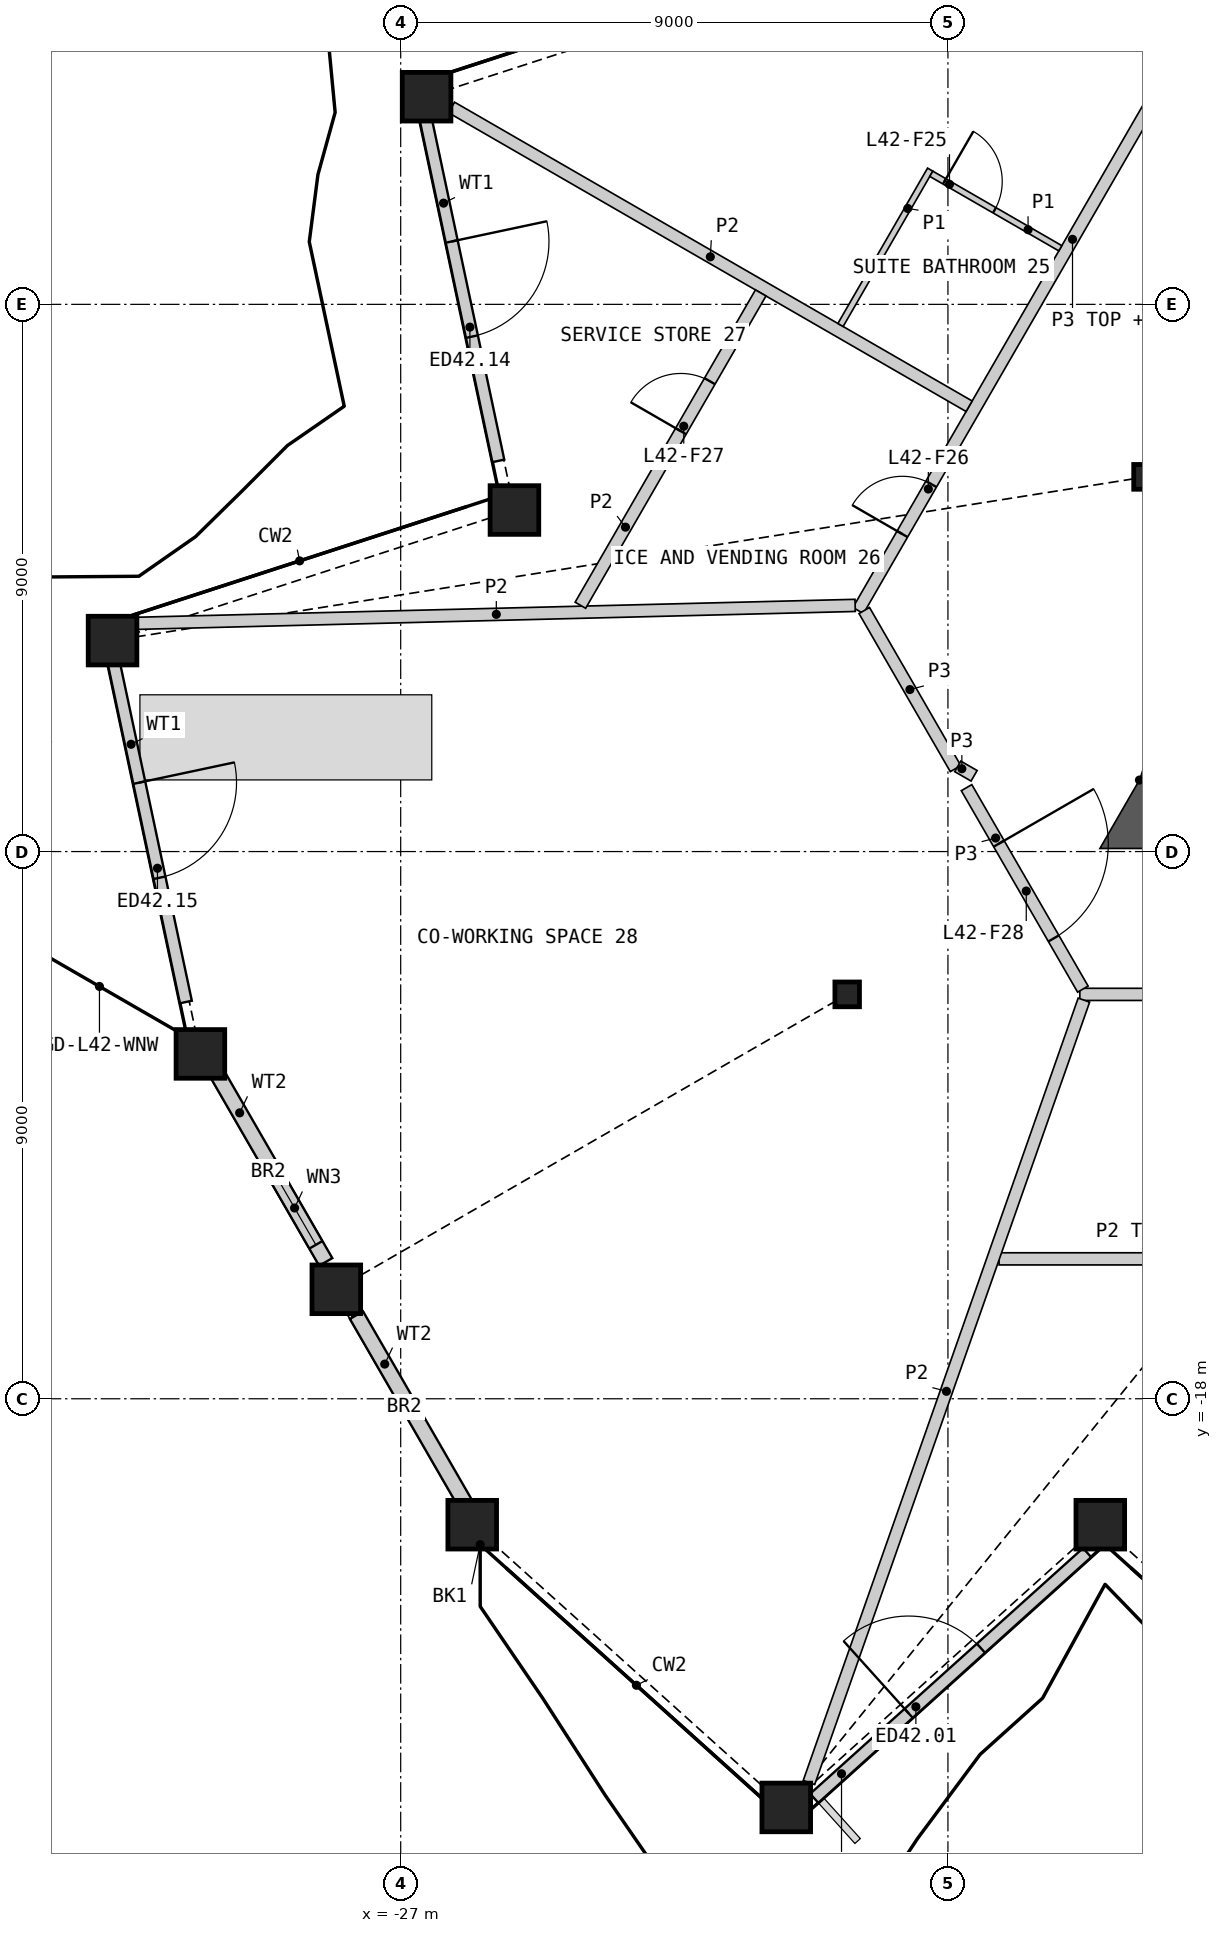
"""IFC4 building model, lengths in metres.
Left out: names, types, materials, properties, quantities, classifications, styles, units other than length and angle.
Written with IfcOpenShell. Run it as: python <this file> out.ifc"""

import sys

from ifc_helpers import new_model, si_unit, direction, frame, frame_2d, origin, origin_2d, place, context, subcontext, project, spatial, polyline, rectangle, hollow_rectangle, i_section, outline, extrude, element, fill, save


model = new_model("IFC4")
c1 = context("Model", 3, precision=1e-05, world=origin(), true_north=direction((0.0, 1.0)))
c2 = subcontext(c1, "Body", "Model", "MODEL_VIEW")
j1 = project(units=[si_unit("LENGTHUNIT", "METRE"), si_unit("PLANEANGLEUNIT", "RADIAN")], contexts=[c1])
p1 = place(None, origin())
s1 = spatial("IfcSite", under=j1, at=p1, CompositionType="ELEMENT")
p2 = place(p1, origin())
s2 = spatial("IfcBuilding", under=s1, at=p2, CompositionType="ELEMENT")
p3 = place(p2, frame((0.0, 0.0, 194.4)))
s3 = spatial("IfcBuildingStorey", under=s2, at=p3, CompositionType="ELEMENT", Elevation=194.4)
for number, where, z_axis, x_axis in (
    (1, (-25.823, -20.071, 0.0), (0.0, 0.0, 1.0), (1.0, 0.0, 0.0)),
    (2, (-20.659, -24.722, 0.0), (0.0, 0.0, 1.0), (1.0, 0.0, 0.0)),
    (3, (-15.494, -20.071, 0.0), (0.0, 0.0, 1.0), (1.0, 0.0, 0.0)),
    (4, (-26.574, 3.415, 0.0), (0.0, 0.0, 1.0), (1.0, 0.0, 0.0)),
    (5, (-25.129, -3.383, 0.0), (0.0, 0.0, 1.0), (1.0, 0.0, 0.0)),
    (6, (-31.739, -5.53, 0.0), (0.0, 0.0, 1.0), (1.0, 0.0, 0.0)),
    (7, (-30.294, -12.328, 0.0), (0.0, 0.0, 1.0), (1.0, 0.0, 0.0)),
    (8, (-28.059, -16.2, 0.0), (0.0, 0.0, 1.0), (1.0, 0.0, 0.0)),
):
    element("IfcColumn", number, at=place(p3, frame(where, z_axis=z_axis, x_axis=x_axis)), inside=s3, PredefinedType="COLUMN", context=c2, shape_type="SweptSolid", body=[
        extrude(hollow_rectangle(XDim=0.8, YDim=0.8, WallThickness=0.05, at=origin_2d()), origin(), (0.0, 0.0, 1.0), 3.6),
    ])
for number, where, z_axis, x_axis in (
    (9, (-14.743, -2.837, 0.0), (0.0, 0.0, 1.0), (1.0, 0.0, 0.0)),
    (10, (-19.657, -11.349, 0.0), (0.0, 0.0, 1.0), (1.0, 0.0, 0.0)),
):
    element("IfcColumn", number, at=place(p3, frame(where, z_axis=z_axis, x_axis=x_axis)), inside=s3, PredefinedType="COLUMN", context=c2, shape_type="SweptSolid", body=[
        extrude(i_section(OverallWidth=0.404, OverallDepth=0.407, WebThickness=0.027, FlangeThickness=0.044, at=origin_2d()), origin(), (0.0, 0.0, 1.0), 3.6),
    ])
p4 = place(p3, frame((-20.199, -24.571, 0.0), z_axis=(0.0, 0.0, 1.0), x_axis=(0.743151394339, 0.669123310827, 0.0)))
e11 = element("IfcWall", 11, at=p4, inside=s3, PredefinedType="SOLIDWALL", context=c2, shape_type="SweptSolid", body=[
    extrude(rectangle(XDim=6.039, YDim=0.2, at=frame_2d((3.019, 0.0))), origin(), (0.0, 0.0, 1.0), 2.701),
])
p5 = place(p4, frame((2.089, 0.0, 0.0)))
e12 = element("IfcOpeningElement", 12, at=p5, cuts=e11, PredefinedType="OPENING", context=c2, shape_type="SweptSolid", body=[
    extrude(rectangle(XDim=1.6, YDim=2.4, at=frame_2d((0.8, 1.2))), frame((0.0, 0.11, 0.0), z_axis=(0.0, -1.0, 0.0), x_axis=(1.0, 0.0, 0.0)), (0.0, 0.0, 1.0), 0.22),
])
p6 = place(p3, frame((-26.595, 3.078, 0.0), z_axis=(0.0, 0.0, 1.0), x_axis=(0.207907263894, -0.978148541695, 0.0)))
e13 = element("IfcWall", 13, at=p6, inside=s3, PredefinedType="SOLIDWALL", context=c2, shape_type="SweptSolid", body=[
    extrude(rectangle(XDim=5.779, YDim=0.2, at=frame_2d((2.889, 0.0))), origin(), (0.0, 0.0, 1.0), 2.701),
])
p7 = place(p6, frame((2.089, 0.0, 0.0)))
e14 = element("IfcOpeningElement", 14, at=p7, cuts=e13, PredefinedType="OPENING", context=c2, shape_type="SweptSolid", body=[
    extrude(rectangle(XDim=1.6, YDim=2.4, at=frame_2d((0.8, 1.2))), frame((0.0, 0.11, 0.0), z_axis=(0.0, -1.0, 0.0), x_axis=(1.0, 0.0, 0.0)), (0.0, 0.0, 1.0), 0.22),
])
p8 = place(p3, frame((-31.734, -5.822, 0.0), z_axis=(0.0, 0.0, 1.0), x_axis=(0.207907263894, -0.978148541695, 0.0)))
e15 = element("IfcWall", 15, at=p8, inside=s3, PredefinedType="SOLIDWALL", context=c2, shape_type="SweptSolid", body=[
    extrude(rectangle(XDim=5.779, YDim=0.2, at=frame_2d((2.889, 0.0))), origin(), (0.0, 0.0, 1.0), 2.701),
])
p9 = place(p8, frame((2.089, 0.0, 0.0)))
e16 = element("IfcOpeningElement", 16, at=p9, cuts=e15, PredefinedType="OPENING", context=c2, shape_type="SweptSolid", body=[
    extrude(rectangle(XDim=1.6, YDim=2.4, at=frame_2d((0.8, 1.2))), frame((0.0, 0.11, 0.0), z_axis=(0.0, -1.0, 0.0), x_axis=(1.0, 0.0, 0.0)), (0.0, 0.0, 1.0), 0.22),
])
p10 = place(p3, frame((-30.12, -12.48, 0.0), z_axis=(0.0, 0.0, 1.0), x_axis=(0.500034075199, -0.866005729565, 0.0)))
e17 = element("IfcWall", 17, at=p10, inside=s3, PredefinedType="SOLIDWALL", context=c2, shape_type="SweptSolid", body=[
    extrude(rectangle(XDim=3.775, YDim=0.25, at=frame_2d((1.888, 0.0))), origin(), (0.0, 0.0, 1.0), 2.701),
])
p11 = place(p10, frame((2.05, 0.0, 1.7)))
e18 = element("IfcOpeningElement", 18, at=p11, cuts=e17, PredefinedType="OPENING", context=c2, shape_type="SweptSolid", body=[
    extrude(rectangle(XDim=1.4, YDim=0.8, at=frame_2d((0.7, 0.4))), frame((0.0, 0.135, 0.0), z_axis=(0.0, -1.0, 0.0), x_axis=(1.0, 0.0, 0.0)), (0.0, 0.0, 1.0), 0.27),
])
p12 = place(p3, frame((-27.727, -16.625, 0.0), z_axis=(0.0, 0.0, 1.0), x_axis=(0.499995303914, -0.866028115054, 0.0)))
e19 = element("IfcWall", 19, at=p12, inside=s3, PredefinedType="SOLIDWALL", context=c2, shape_type="SweptSolid", body=[
    extrude(rectangle(XDim=3.718, YDim=0.25, at=frame_2d((1.859, 0.0))), origin(), (0.0, 0.0, 1.0), 2.701),
])
p13 = place(p3, frame((-12.65, -4.763, 0.0), z_axis=(0.0, 0.0, 1.0), x_axis=(-0.499996681051, -0.866027319972, 0.0)))
e20 = element("IfcWall", 20, at=p13, inside=s3, PredefinedType="SHEAR", context=c2, shape_type="SweptSolid", body=[
    extrude(rectangle(XDim=3.75, YDim=0.75, at=frame_2d((1.875, 0.0))), origin(), (0.0, 0.0, 1.0), 3.25),
])
p14 = place(p3, origin())
e21 = element("IfcWall", 21, at=p14, inside=s3, PredefinedType="SHEAR", context=c2, shape_type="SweptSolid", body=[
    extrude(outline(polyline([(-14.851, -7.824), (-14.201, -8.199), (-14.201, -8.949), (-15.5, -8.949), (-14.851, -7.824)])), origin(), (0.0, 0.0, 1.0), 3.25),
])
p15 = place(p3, frame((-19.476, -5.035, 0.0), z_axis=(0.0, 0.0, 1.0), x_axis=(0.500000757641, 0.86602496636, 0.0)))
e22 = element("IfcWall", 22, at=p15, inside=s3, PredefinedType="PARTITIONING", context=c2, shape_type="SweptSolid", body=[
    extrude(rectangle(XDim=28.198, YDim=0.2, at=frame_2d((14.099, 0.0))), origin(), (0.0, 0.0, 1.0), 3.25),
])
p16 = place(p15, frame((25.796, 0.0, 0.0)))
e23 = element("IfcOpeningElement", 23, at=p16, cuts=e22, PredefinedType="OPENING", context=c2, shape_type="SweptSolid", body=[
    extrude(rectangle(XDim=0.95, YDim=2.1, at=frame_2d((0.475, 1.05))), frame((0.0, 0.11, 0.0), z_axis=(0.0, -1.0, 0.0), x_axis=(1.0, 0.0, 0.0)), (0.0, 0.0, 1.0), 0.22),
])
p17 = place(p15, frame((14.603, 0.0, 0.0)))
e24 = element("IfcOpeningElement", 24, at=p17, cuts=e22, PredefinedType="OPENING", context=c2, shape_type="SweptSolid", body=[
    extrude(rectangle(XDim=1.1, YDim=2.1, at=frame_2d((0.55, 1.05))), frame((0.0, 0.11, 0.0), z_axis=(0.0, -1.0, 0.0), x_axis=(1.0, 0.0, 0.0)), (0.0, 0.0, 1.0), 0.22),
])
p18 = place(p15, frame((11.993, 0.0, 0.0)))
e25 = element("IfcOpeningElement", 25, at=p18, cuts=e22, PredefinedType="OPENING", context=c2, shape_type="SweptSolid", body=[
    extrude(rectangle(XDim=1.1, YDim=2.1, at=frame_2d((0.55, 1.05))), frame((0.0, 0.11, 0.0), z_axis=(0.0, -1.0, 0.0), x_axis=(1.0, 0.0, 0.0)), (0.0, 0.0, 1.0), 0.22),
])
p19 = place(p15, frame((1.452, 0.0, 0.0)))
e26 = element("IfcOpeningElement", 26, at=p19, cuts=e22, PredefinedType="OPENING", context=c2, shape_type="SweptSolid", body=[
    extrude(rectangle(XDim=0.95, YDim=2.1, at=frame_2d((0.475, 1.05))), frame((0.0, 0.11, 0.0), z_axis=(0.0, -1.0, 0.0), x_axis=(1.0, 0.0, 0.0)), (0.0, 0.0, 1.0), 0.22),
])
p20 = place(p3, frame((-15.831, -11.349, 0.0), z_axis=(0.0, 0.0, 1.0), x_axis=(1.0, 0.0, 0.0)))
e27 = element("IfcWall", 27, at=p20, inside=s3, PredefinedType="PARTITIONING", context=c2, shape_type="SweptSolid", body=[
    extrude(rectangle(XDim=5.789, YDim=0.2, at=frame_2d((2.894, 0.0))), origin(), (0.0, 0.0, 1.0), 3.25),
])
p21 = place(p3, frame((-17.694, -7.949, 0.0), z_axis=(0.0, 0.0, 1.0), x_axis=(0.499989446428, -0.866031496806, 0.0)))
e28 = element("IfcWall", 28, at=p21, inside=s3, PredefinedType="PARTITIONING", context=c2, shape_type="SweptSolid", body=[
    extrude(rectangle(XDim=3.826, YDim=0.2, at=frame_2d((1.913, 0.0))), origin(), (0.0, 0.0, 1.0), 3.25),
])
p22 = place(p21, frame((1.064, 0.0, 0.0)))
e29 = element("IfcOpeningElement", 29, at=p22, cuts=e28, PredefinedType="OPENING", context=c2, shape_type="SweptSolid", body=[
    extrude(rectangle(XDim=1.8, YDim=2.1, at=frame_2d((0.9, 1.05))), frame((0.0, 0.11, 0.0), z_axis=(0.0, -1.0, 0.0), x_axis=(1.0, 0.0, 0.0)), (0.0, 0.0, 1.0), 0.22),
])
p23 = place(p3, frame((-19.376, -5.035, 0.0), z_axis=(0.0, 0.0, 1.0), x_axis=(0.499952404951, -0.866052881055, 0.0)))
e30 = element("IfcWall", 30, at=p23, inside=s3, PredefinedType="PARTITIONING", context=c2, shape_type="SweptSolid", body=[
    extrude(rectangle(XDim=3.002, YDim=0.2, at=frame_2d((1.501, 0.0))), origin(), (0.0, 0.0, 1.0), 3.25),
])
p24 = place(p3, frame((-17.838, -7.599, 0.0), z_axis=(0.0, 0.0, 1.0), x_axis=(0.866054481515, -0.499949632511, 0.0)))
e31 = element("IfcWall", 31, at=p24, inside=s3, PredefinedType="PARTITIONING", context=c2, shape_type="SweptSolid", body=[
    extrude(rectangle(XDim=0.31, YDim=0.2, at=frame_2d((0.155, 0.0))), origin(), (0.0, 0.0, 1.0), 3.25),
])
p25 = place(p3, frame((-17.159, -15.699, 0.0), z_axis=(0.0, 0.0, 1.0), x_axis=(1.0, 0.0, 0.0)))
e32 = element("IfcWall", 32, at=p25, inside=s3, PredefinedType="PARTITIONING", context=c2, shape_type="SweptSolid", body=[
    extrude(rectangle(XDim=17.059, YDim=0.2, at=frame_2d((8.53, 0.0))), origin(), (0.0, 0.0, 1.0), 2.404),
])
p26 = place(p25, frame((7.655, 0.0, 0.0)))
e33 = element("IfcOpeningElement", 33, at=p26, cuts=e32, PredefinedType="OPENING", context=c2, shape_type="SweptSolid", body=[
    extrude(rectangle(XDim=0.95, YDim=2.1, at=frame_2d((0.475, 1.05))), frame((0.0, 0.11, 0.0), z_axis=(0.0, -1.0, 0.0), x_axis=(1.0, 0.0, 0.0)), (0.0, 0.0, 1.0), 0.22),
])
p27 = place(p3, frame((-20.286, -24.312, 0.0), z_axis=(0.0, 0.0, 1.0), x_axis=(0.331517429591, 0.943449094481, 0.0)))
e34 = element("IfcWall", 34, at=p27, inside=s3, PredefinedType="PARTITIONING", context=c2, shape_type="SweptSolid", body=[
    extrude(rectangle(XDim=13.639, YDim=0.2, at=frame_2d((6.82, 0.0))), origin(), (0.0, 0.0, 1.0), 2.404),
])
p28 = place(p3, frame((-31.329, -5.246, 0.0), z_axis=(0.0, 0.0, 1.0), x_axis=(0.999689013957, 0.024937429174, 0.0)))
e35 = element("IfcWall", 35, at=p28, inside=s3, PredefinedType="PARTITIONING", context=c2, shape_type="SweptSolid", body=[
    extrude(rectangle(XDim=11.807, YDim=0.2, at=frame_2d((5.903, 0.0))), origin(), (0.0, 0.0, 1.0), 2.404),
])
p29 = place(p3, frame((-26.164, 3.239, 0.0), z_axis=(0.0, 0.0, 1.0), x_axis=(0.866025932773, -0.499999083763, 0.0)))
e36 = element("IfcWall", 36, at=p29, inside=s3, PredefinedType="PARTITIONING", context=c2, shape_type="SweptSolid", body=[
    extrude(rectangle(XDim=9.83, YDim=0.2, at=frame_2d((4.915, 0.0))), origin(), (0.0, 0.0, 1.0), 2.404),
])
p30 = place(p3, frame((-24.045, -4.949, 0.0), z_axis=(0.0, 0.0, 1.0), x_axis=(0.500016988964, 0.866015594979, 0.0)))
e37 = element("IfcWall", 37, at=p30, inside=s3, PredefinedType="PARTITIONING", context=c2, shape_type="SweptSolid", body=[
    extrude(rectangle(XDim=5.931, YDim=0.2, at=frame_2d((2.966, 0.0))), origin(), (0.0, 0.0, 1.0), 2.404),
])
p31 = place(p30, frame((3.305, 0.0, 0.0)))
e38 = element("IfcOpeningElement", 38, at=p31, cuts=e37, PredefinedType="OPENING", context=c2, shape_type="SweptSolid", body=[
    extrude(rectangle(XDim=0.95, YDim=2.1, at=frame_2d((0.475, 1.05))), frame((0.0, 0.11, 0.0), z_axis=(0.0, -1.0, 0.0), x_axis=(1.0, 0.0, 0.0)), (0.0, 0.0, 1.0), 0.22),
])
p32 = place(p3, frame((-19.767, -0.339, 0.0), z_axis=(0.0, 0.0, 1.0), x_axis=(0.499939757307, 0.866060182126, 0.0)))
e39 = element("IfcWall", 39, at=p32, inside=s3, PredefinedType="PARTITIONING", context=c2, shape_type="SweptSolid", body=[
    extrude(rectangle(XDim=2.95, YDim=0.1, at=frame_2d((1.475, 0.0))), origin(), (0.0, 0.0, 1.0), 2.404),
])
p33 = place(p3, frame((-18.273, 2.147, 0.0), z_axis=(0.0, 0.0, 1.0), x_axis=(0.866014668023, -0.500018594424, 0.0)))
e40 = element("IfcWall", 40, at=p33, inside=s3, PredefinedType="PARTITIONING", context=c2, shape_type="SweptSolid", body=[
    extrude(rectangle(XDim=2.45, YDim=0.1, at=frame_2d((1.225, 0.0))), origin(), (0.0, 0.0, 1.0), 2.404),
])
p34 = place(p33, frame((0.25, 0.0, 0.0)))
e41 = element("IfcOpeningElement", 41, at=p34, cuts=e40, PredefinedType="OPENING", context=c2, shape_type="SweptSolid", body=[
    extrude(rectangle(XDim=0.95, YDim=2.1, at=frame_2d((0.475, 1.05))), frame((0.0, 0.06, 0.0), z_axis=(0.0, -1.0, 0.0), x_axis=(1.0, 0.0, 0.0)), (0.0, 0.0, 1.0), 0.12),
])
p35 = place(p5, origin())
e42 = element("IfcDoor", 42, at=p35, inside=s3, OperationType="DOUBLE_DOOR_SINGLE_SWING", PredefinedType="DOOR", context=c2, shape_type="SweptSolid", body=[
    extrude(rectangle(XDim=1.6, YDim=2.4, at=frame_2d((0.8, 1.2))), frame((0.0, 0.025, 0.0), z_axis=(0.0, -1.0, 0.0), x_axis=(1.0, 0.0, 0.0)), (0.0, 0.0, 1.0), 0.05),
])
fill(e12, e42)
p36 = place(p7, origin())
e43 = element("IfcDoor", 43, at=p36, inside=s3, OperationType="DOUBLE_DOOR_SINGLE_SWING", PredefinedType="DOOR", context=c2, shape_type="SweptSolid", body=[
    extrude(rectangle(XDim=1.6, YDim=2.4, at=frame_2d((0.8, 1.2))), frame((0.0, 0.025, 0.0), z_axis=(0.0, -1.0, 0.0), x_axis=(1.0, 0.0, 0.0)), (0.0, 0.0, 1.0), 0.05),
])
fill(e14, e43)
p37 = place(p9, origin())
e44 = element("IfcDoor", 44, at=p37, inside=s3, OperationType="DOUBLE_DOOR_SINGLE_SWING", PredefinedType="DOOR", context=c2, shape_type="SweptSolid", body=[
    extrude(rectangle(XDim=1.6, YDim=2.4, at=frame_2d((0.8, 1.2))), frame((0.0, 0.025, 0.0), z_axis=(0.0, -1.0, 0.0), x_axis=(1.0, 0.0, 0.0)), (0.0, 0.0, 1.0), 0.05),
])
fill(e16, e44)
p38 = place(p11, origin())
e45 = element("IfcWindow", 45, at=p38, inside=s3, PartitioningType="SINGLE_PANEL", PredefinedType="WINDOW", context=c2, shape_type="SweptSolid", body=[
    extrude(rectangle(XDim=1.4, YDim=0.8, at=frame_2d((0.7, 0.4))), frame((0.0, 0.03, 0.0), z_axis=(0.0, -1.0, 0.0), x_axis=(1.0, 0.0, 0.0)), (0.0, 0.0, 1.0), 0.06),
])
fill(e18, e45)
p39 = place(p34, origin())
e46 = element("IfcDoor", 46, at=p39, inside=s3, OperationType="SINGLE_SWING_LEFT", PredefinedType="DOOR", context=c2, shape_type="SweptSolid", body=[
    extrude(rectangle(XDim=0.95, YDim=2.1, at=frame_2d((0.475, 1.05))), frame((0.0, 0.025, 0.0), z_axis=(0.0, -1.0, 0.0), x_axis=(1.0, 0.0, 0.0)), (0.0, 0.0, 1.0), 0.05),
])
fill(e41, e46)
p40 = place(p19, origin())
e47 = element("IfcDoor", 47, at=p40, inside=s3, OperationType="SINGLE_SWING_LEFT", PredefinedType="DOOR", context=c2, shape_type="SweptSolid", body=[
    extrude(rectangle(XDim=0.95, YDim=2.1, at=frame_2d((0.475, 1.05))), frame((0.0, 0.025, 0.0), z_axis=(0.0, -1.0, 0.0), x_axis=(1.0, 0.0, 0.0)), (0.0, 0.0, 1.0), 0.05),
])
fill(e26, e47)
p41 = place(p31, origin())
e48 = element("IfcDoor", 48, at=p41, inside=s3, OperationType="SINGLE_SWING_LEFT", PredefinedType="DOOR", context=c2, shape_type="SweptSolid", body=[
    extrude(rectangle(XDim=0.95, YDim=2.1, at=frame_2d((0.475, 1.05))), frame((0.0, 0.025, 0.0), z_axis=(0.0, -1.0, 0.0), x_axis=(1.0, 0.0, 0.0)), (0.0, 0.0, 1.0), 0.05),
])
fill(e38, e48)
p42 = place(p22, origin())
e49 = element("IfcDoor", 49, at=p42, inside=s3, OperationType="DOUBLE_DOOR_SINGLE_SWING", PredefinedType="DOOR", context=c2, shape_type="SweptSolid", body=[
    extrude(rectangle(XDim=1.8, YDim=2.1, at=frame_2d((0.9, 1.05))), frame((0.0, 0.025, 0.0), z_axis=(0.0, -1.0, 0.0), x_axis=(1.0, 0.0, 0.0)), (0.0, 0.0, 1.0), 0.05),
])
fill(e29, e49)
save(model, sys.argv[1])
